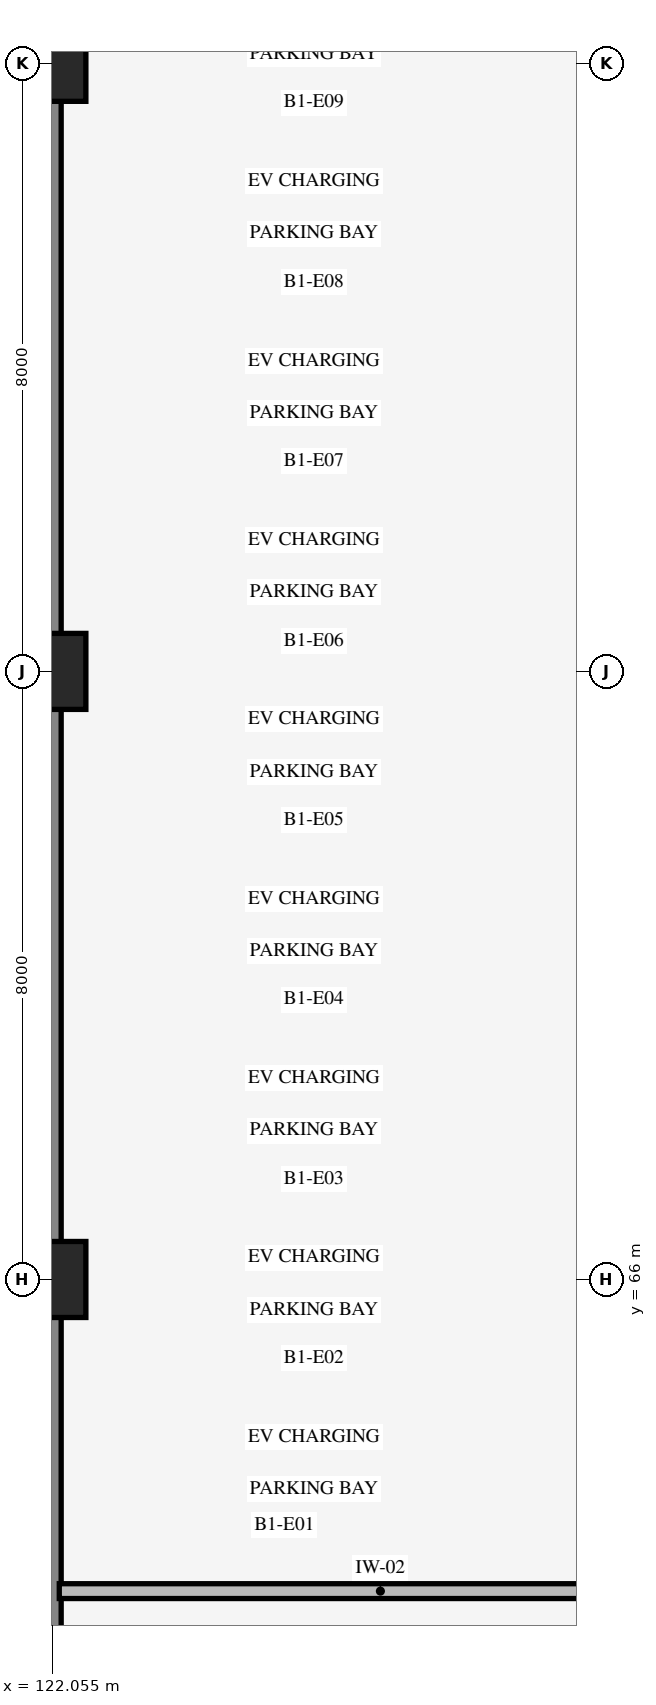
"""IFC4 building model, lengths in metres.
Left out: names, types, materials, properties, quantities, classifications, styles, units other than length and angle.
Written with IfcOpenShell. Run it as: python <this file> out.ifc"""

import sys

from ifc_helpers import new_model, si_unit, direction, frame, frame_2d, origin, origin_2d, place, context, subcontext, project, spatial, rectangle, extrude, element, save


model = new_model("IFC4")
c1 = context("Model", 3, precision=1e-05, world=origin(), true_north=direction((0.0, 1.0)))
c2 = subcontext(c1, "Body", "Model", "MODEL_VIEW")
j1 = project(units=[si_unit("LENGTHUNIT", "METRE"), si_unit("PLANEANGLEUNIT", "RADIAN")], contexts=[c1])
p1 = place(None, origin())
s1 = spatial("IfcSite", under=j1, at=p1, CompositionType="ELEMENT")
p2 = place(p1, origin())
s2 = spatial("IfcBuilding", under=s1, at=p2, CompositionType="ELEMENT")
p3 = place(p2, frame((0.0, 0.0, -4.5)))
s3 = spatial("IfcBuildingStorey", under=s2, at=p3, CompositionType="ELEMENT", Elevation=-4.5)
p4 = place(p3, frame((122.0, 106.0, 0.0), z_axis=(0.0, 0.0, 1.0), x_axis=(0.0, -1.0, 0.0)))
e1 = element("IfcWall", 1, at=p4, inside=s3, PredefinedType="SOLIDWALL", context=c2, shape_type="SweptSolid", body=[
    extrude(rectangle(XDim=80.0, YDim=0.35, at=frame_2d((40.0, 0.0))), origin(), (0.0, 0.0, 1.0), 4.22),
])
for number, where, z_axis, x_axis in (
    (2, (122.0, 66.0, 0.0), (0.0, 0.0, 1.0), (1.0, 0.0, 0.0)),
    (3, (122.0, 74.0, 0.0), (0.0, 0.0, 1.0), (1.0, 0.0, 0.0)),
    (4, (122.0, 82.0, 0.0), (0.0, 0.0, 1.0), (1.0, 0.0, 0.0)),
):
    element("IfcColumn", number, at=place(p3, frame(where, z_axis=z_axis, x_axis=x_axis)), inside=s3, PredefinedType="COLUMN", context=c2, shape_type="SweptSolid", body=[
        extrude(rectangle(XDim=1.0, YDim=1.0, at=origin_2d()), origin(), (0.0, 0.0, 1.0), 4.5),
    ])
p5 = place(p3, frame((122.15, 61.9, 0.0), z_axis=(0.0, 0.0, 1.0), x_axis=(1.0, 0.0, 0.0)))
e5 = element("IfcWall", 5, at=p5, inside=s3, PredefinedType="STANDARD", context=c2, shape_type="SweptSolid", body=[
    extrude(rectangle(XDim=8.45, YDim=0.195, at=frame_2d((4.225, 0.0))), origin(), (0.0, 0.0, 1.0), 4.135),
])
save(model, sys.argv[1])
